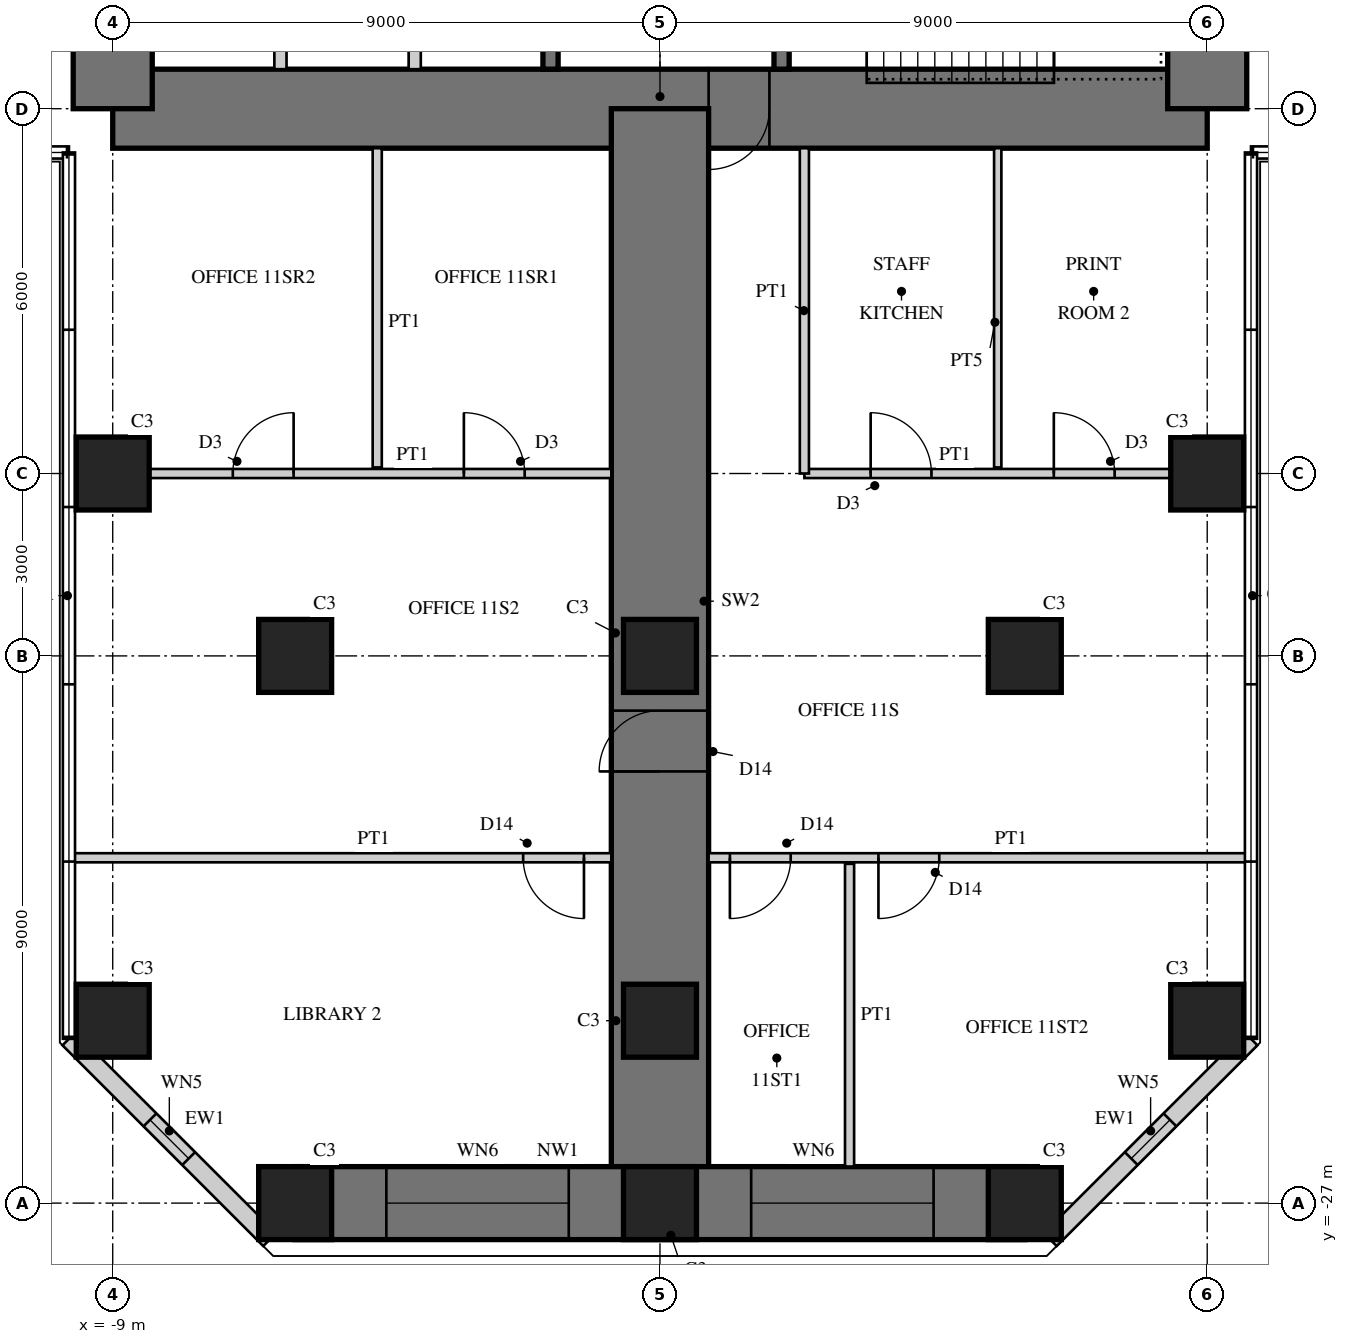
"""IFC4 building model, lengths in metres.
Left out: names, types, materials, properties, quantities, classifications, styles, units other than length and angle.
Written with IfcOpenShell. Run it as: python <this file> out.ifc"""

import sys

from ifc_helpers import new_model, si_unit, direction, frame, frame_2d, origin, origin_2d, place, context, subcontext, project, spatial, rectangle, hollow_rectangle, extrude, element, fill, save


model = new_model("IFC4")
c1 = context("Model", 3, precision=1e-05, world=origin(), true_north=direction((0.0, 1.0)))
c2 = subcontext(c1, "Body", "Model", "MODEL_VIEW")
j1 = project(units=[si_unit("LENGTHUNIT", "METRE"), si_unit("PLANEANGLEUNIT", "RADIAN")], contexts=[c1])
p1 = place(None, origin())
s1 = spatial("IfcSite", under=j1, at=p1, CompositionType="ELEMENT")
p2 = place(p1, origin())
s2 = spatial("IfcBuilding", under=s1, at=p2, CompositionType="ELEMENT")
p3 = place(p2, frame((0.0, 0.0, 47.5)))
s3 = spatial("IfcBuildingStorey", under=s2, at=p3, CompositionType="ELEMENT", Elevation=47.5)
p4 = place(p3, frame((-9.0, -9.0, 0.0), z_axis=(0.0, 0.0, 1.0), x_axis=(1.0, 0.0, 0.0)))
e1 = element("IfcWall", 1, at=p4, inside=s3, PredefinedType="SHEAR", context=c2, shape_type="SweptSolid", body=[
    extrude(rectangle(XDim=18.0, YDim=1.3, at=frame_2d((9.0, 0.0))), origin(), (0.0, 0.0, 1.0), 4.0),
])
p5 = place(p4, frame((9.8, 0.0, 0.0)))
e2 = element("IfcOpeningElement", 2, at=p5, cuts=e1, PredefinedType="OPENING", context=c2, shape_type="SweptSolid", body=[
    extrude(rectangle(XDim=1.0, YDim=2.4, at=frame_2d((0.5, 1.2))), frame((0.0, 0.66, 0.0), z_axis=(0.0, -1.0, 0.0), x_axis=(1.0, 0.0, 0.0)), (0.0, 0.0, 1.0), 1.32),
])
p6 = place(p3, frame((9.0, -9.0, 0.0), z_axis=(0.0, 0.0, 1.0), x_axis=(0.0, 1.0, 0.0)))
e3 = element("IfcWall", 3, at=p6, inside=s3, PredefinedType="SHEAR", context=c2, shape_type="SweptSolid", body=[
    extrude(rectangle(XDim=18.0, YDim=1.3, at=frame_2d((9.0, 0.0))), origin(), (0.0, 0.0, 1.0), 4.0),
])
p7 = place(p6, frame((9.8, 0.0, 0.0)))
e4 = element("IfcOpeningElement", 4, at=p7, cuts=e3, PredefinedType="OPENING", context=c2, shape_type="SweptSolid", body=[
    extrude(rectangle(XDim=1.0, YDim=2.4, at=frame_2d((0.5, 1.2))), frame((0.0, 0.66, 0.0), z_axis=(0.0, -1.0, 0.0), x_axis=(1.0, 0.0, 0.0)), (0.0, 0.0, 1.0), 1.32),
])
p8 = place(p3, frame((-9.0, 9.0, 0.0), z_axis=(0.0, 0.0, 1.0), x_axis=(0.0, -1.0, 0.0)))
e5 = element("IfcWall", 5, at=p8, inside=s3, PredefinedType="SHEAR", context=c2, shape_type="SweptSolid", body=[
    extrude(rectangle(XDim=18.0, YDim=1.3, at=frame_2d((9.0, 0.0))), origin(), (0.0, 0.0, 1.0), 4.0),
])
p9 = place(p8, frame((9.8, 0.0, 0.0)))
e6 = element("IfcOpeningElement", 6, at=p9, cuts=e5, PredefinedType="OPENING", context=c2, shape_type="SweptSolid", body=[
    extrude(rectangle(XDim=1.0, YDim=2.4, at=frame_2d((0.5, 1.2))), frame((0.0, 0.66, 0.0), z_axis=(0.0, -1.0, 0.0), x_axis=(1.0, 0.0, 0.0)), (0.0, 0.0, 1.0), 1.32),
])
p10 = place(p3, frame((-1.8, -1.875, 0.0), z_axis=(0.0, 0.0, 1.0), x_axis=(0.0, -1.0, 0.0)))
e7 = element("IfcWall", 7, at=p10, inside=s3, PredefinedType="SHEAR", context=c2, shape_type="SweptSolid", body=[
    extrude(rectangle(XDim=6.475, YDim=0.25, at=frame_2d((3.238, 0.0))), origin(), (0.0, 0.0, 1.0), 4.0),
])
p11 = place(p10, frame((1.875, 0.0, 0.0)))
e8 = element("IfcOpeningElement", 8, at=p11, cuts=e7, PredefinedType="OPENING", context=c2, shape_type="SweptSolid", body=[
    extrude(rectangle(XDim=1.6, YDim=2.4, at=frame_2d((0.8, 1.2))), frame((0.0, 0.135, 0.0), z_axis=(0.0, -1.0, 0.0), x_axis=(1.0, 0.0, 0.0)), (0.0, 0.0, 1.0), 0.27),
])
for number, where, z_axis, x_axis in (
    (9, (-4.033, -5.975, 0.0), (0.0, 0.0, 1.0), (0.0, -1.0, 0.0)),
    (10, (-6.242, -5.975, 0.0), (0.0, 0.0, 1.0), (0.0, -1.0, 0.0)),
):
    element("IfcWall", number, at=place(p3, frame(where, z_axis=z_axis, x_axis=x_axis)), inside=s3, PredefinedType="PARTITIONING", context=c2, shape_type="SweptSolid", body=[
        extrude(rectangle(XDim=2.375, YDim=0.2, at=frame_2d((1.188, 0.0))), origin(), (0.0, 0.0, 1.0), 4.0),
    ])
p12 = place(p3, frame((2.0, -1.675, 0.0), z_axis=(0.0, 0.0, 1.0), x_axis=(0.0, -1.0, 0.0)))
e11 = element("IfcWall", 11, at=p12, inside=s3, PredefinedType="SHEAR", context=c2, shape_type="SweptSolid", body=[
    extrude(rectangle(XDim=6.675, YDim=0.25, at=frame_2d((3.337, 0.0))), origin(), (0.0, 0.0, 1.0), 4.0),
])
p13 = place(p12, frame((0.725, 0.0, 0.0)))
e12 = element("IfcOpeningElement", 12, at=p13, cuts=e11, PredefinedType="OPENING", context=c2, shape_type="SweptSolid", body=[
    extrude(rectangle(XDim=1.0, YDim=2.1, at=frame_2d((0.5, 1.05))), frame((0.0, 0.135, 0.0), z_axis=(0.0, -1.0, 0.0), x_axis=(1.0, 0.0, 0.0)), (0.0, 0.0, 1.0), 0.27),
])
p14 = place(p3, frame((0.0, -9.0, 0.0), z_axis=(0.0, 0.0, 1.0), x_axis=(0.0, -1.0, 0.0)))
e13 = element("IfcWall", 13, at=p14, inside=s3, PredefinedType="SHEAR", context=c2, shape_type="SweptSolid", body=[
    extrude(rectangle(XDim=18.0, YDim=1.6, at=frame_2d((9.0, 0.0))), origin(), (0.0, 0.0, 1.0), 4.0),
])
p15 = place(p14, frame((9.9, 0.0, 0.0)))
e14 = element("IfcOpeningElement", 14, at=p15, cuts=e13, PredefinedType="OPENING", context=c2, shape_type="SweptSolid", body=[
    extrude(rectangle(XDim=1.0, YDim=2.2, at=frame_2d((0.5, 1.1))), frame((0.0, 0.81, 0.0), z_axis=(0.0, -1.0, 0.0), x_axis=(1.0, 0.0, 0.0)), (0.0, 0.0, 1.0), 1.62),
])
p16 = place(p3, frame((-6.0, -27.0, 0.0), z_axis=(0.0, 0.0, 1.0), x_axis=(1.0, 0.0, 0.0)))
e15 = element("IfcWall", 15, at=p16, inside=s3, PredefinedType="SHEAR", context=c2, shape_type="SweptSolid", body=[
    extrude(rectangle(XDim=12.0, YDim=1.2, at=frame_2d((6.0, 0.0))), origin(), (0.0, 0.0, 1.0), 4.0),
])
p17 = place(p16, frame((1.5, 0.0, 0.6)))
e16 = element("IfcOpeningElement", 16, at=p17, cuts=e15, PredefinedType="OPENING", context=c2, shape_type="SweptSolid", body=[
    extrude(rectangle(XDim=3.0, YDim=2.4, at=frame_2d((1.5, 1.2))), frame((0.0, 0.61, 0.0), z_axis=(0.0, -1.0, 0.0), x_axis=(1.0, 0.0, 0.0)), (0.0, 0.0, 1.0), 1.22),
])
p18 = place(p16, frame((7.5, 0.0, 0.6)))
e17 = element("IfcOpeningElement", 17, at=p18, cuts=e15, PredefinedType="OPENING", context=c2, shape_type="SweptSolid", body=[
    extrude(rectangle(XDim=3.0, YDim=2.4, at=frame_2d((1.5, 1.2))), frame((0.0, 0.61, 0.0), z_axis=(0.0, -1.0, 0.0), x_axis=(1.0, 0.0, 0.0)), (0.0, 0.0, 1.0), 1.22),
])
for number, where, z_axis, x_axis in (
    (18, (-9.0, -15.0, 0.0), (0.0, 0.0, 1.0), (1.0, 0.0, 0.0)),
    (19, (-9.0, -24.0, 0.0), (0.0, 0.0, 1.0), (1.0, 0.0, 0.0)),
    (20, (9.0, -15.0, 0.0), (0.0, 0.0, 1.0), (1.0, 0.0, 0.0)),
    (21, (9.0, -24.0, 0.0), (0.0, 0.0, 1.0), (1.0, 0.0, 0.0)),
    (22, (-6.0, -27.0, 0.0), (0.0, 0.0, 1.0), (1.0, 0.0, 0.0)),
    (23, (0.0, -27.0, 0.0), (0.0, 0.0, 1.0), (1.0, 0.0, 0.0)),
    (24, (6.0, -27.0, 0.0), (0.0, 0.0, 1.0), (1.0, 0.0, 0.0)),
    (25, (-6.0, -18.0, 0.0), (0.0, 0.0, 1.0), (1.0, 0.0, 0.0)),
    (26, (0.0, -18.0, 0.0), (0.0, 0.0, 1.0), (1.0, 0.0, 0.0)),
    (27, (6.0, -18.0, 0.0), (0.0, 0.0, 1.0), (1.0, 0.0, 0.0)),
    (28, (0.0, -24.0, 0.0), (0.0, 0.0, 1.0), (1.0, 0.0, 0.0)),
):
    element("IfcColumn", number, at=place(p3, frame(where, z_axis=z_axis, x_axis=x_axis)), inside=s3, PredefinedType="COLUMN", context=c2, shape_type="SweptSolid", body=[
        extrude(rectangle(XDim=1.2, YDim=1.2, at=origin_2d()), origin(), (0.0, 0.0, 1.0), 4.0),
    ])
p19 = place(p3, frame((-9.72, -24.298, 0.0), z_axis=(0.0, 0.0, 1.0), x_axis=(0.707106781187, -0.707106781187, 0.0)))
e29 = element("IfcWall", 29, at=p19, inside=s3, PredefinedType="SOLIDWALL", context=c2, shape_type="SweptSolid", body=[
    extrude(rectangle(XDim=4.669, YDim=0.3, at=frame_2d((2.335, 0.0))), origin(), (0.0, 0.0, 1.0), 3.8),
])
p20 = place(p19, frame((1.885, 0.0, 0.3)))
e30 = element("IfcOpeningElement", 30, at=p20, cuts=e29, PredefinedType="OPENING", context=c2, shape_type="SweptSolid", body=[
    extrude(rectangle(XDim=0.9, YDim=2.4, at=frame_2d((0.45, 1.2))), frame((0.0, 0.16, 0.0), z_axis=(0.0, -1.0, 0.0), x_axis=(1.0, 0.0, 0.0)), (0.0, 0.0, 1.0), 0.32),
])
p21 = place(p3, frame((6.418, -27.6, 0.0), z_axis=(0.0, 0.0, 1.0), x_axis=(0.707106781187, 0.707106781187, 0.0)))
e31 = element("IfcWall", 31, at=p21, inside=s3, PredefinedType="SOLIDWALL", context=c2, shape_type="SweptSolid", body=[
    extrude(rectangle(XDim=4.669, YDim=0.3, at=frame_2d((2.335, 0.0))), origin(), (0.0, 0.0, 1.0), 3.8),
])
p22 = place(p21, frame((1.885, 0.0, 0.3)))
e32 = element("IfcOpeningElement", 32, at=p22, cuts=e31, PredefinedType="OPENING", context=c2, shape_type="SweptSolid", body=[
    extrude(rectangle(XDim=0.9, YDim=2.4, at=frame_2d((0.45, 1.2))), frame((0.0, 0.16, 0.0), z_axis=(0.0, -1.0, 0.0), x_axis=(1.0, 0.0, 0.0)), (0.0, 0.0, 1.0), 0.32),
])
p23 = place(p3, frame((2.375, -15.0, 0.0), z_axis=(0.0, 0.0, 1.0), x_axis=(1.0, 0.0, 0.0)))
e33 = element("IfcWall", 33, at=p23, inside=s3, PredefinedType="PARTITIONING", context=c2, shape_type="SweptSolid", body=[
    extrude(rectangle(XDim=6.025, YDim=0.15, at=frame_2d((3.012, 0.0))), origin(), (0.0, 0.0, 1.0), 2.95),
])
p24 = place(p23, frame((1.09, 0.0, 0.0)))
e34 = element("IfcOpeningElement", 34, at=p24, cuts=e33, PredefinedType="OPENING", context=c2, shape_type="SweptSolid", body=[
    extrude(rectangle(XDim=1.0, YDim=2.1, at=frame_2d((0.5, 1.05))), frame((0.0, 0.085, 0.0), z_axis=(0.0, -1.0, 0.0), x_axis=(1.0, 0.0, 0.0)), (0.0, 0.0, 1.0), 0.17),
])
p25 = place(p23, frame((4.102, 0.0, 0.0)))
e35 = element("IfcOpeningElement", 35, at=p25, cuts=e33, PredefinedType="OPENING", context=c2, shape_type="SweptSolid", body=[
    extrude(rectangle(XDim=1.0, YDim=2.1, at=frame_2d((0.5, 1.05))), frame((0.0, 0.085, 0.0), z_axis=(0.0, -1.0, 0.0), x_axis=(1.0, 0.0, 0.0)), (0.0, 0.0, 1.0), 0.17),
])
p26 = place(p3, frame((2.375, -9.65, 0.0), z_axis=(0.0, 0.0, 1.0), x_axis=(0.0, -1.0, 0.0)))
e36 = element("IfcWall", 36, at=p26, inside=s3, PredefinedType="PARTITIONING", context=c2, shape_type="SweptSolid", body=[
    extrude(rectangle(XDim=5.35, YDim=0.15, at=frame_2d((2.675, 0.0))), origin(), (0.0, 0.0, 1.0), 3.8),
])
p27 = place(p3, frame((5.555, -9.65, 0.0), z_axis=(0.0, 0.0, 1.0), x_axis=(0.0, -1.0, 0.0)))
e37 = element("IfcWall", 37, at=p27, inside=s3, PredefinedType="PLUMBINGWALL", context=c2, shape_type="SweptSolid", body=[
    extrude(rectangle(XDim=5.25, YDim=0.12, at=frame_2d((2.625, 0.0))), origin(), (0.0, 0.0, 1.0), 3.8),
])
p28 = place(p3, frame((-8.4, -15.0, 0.0), z_axis=(0.0, 0.0, 1.0), x_axis=(1.0, 0.0, 0.0)))
e38 = element("IfcWall", 38, at=p28, inside=s3, PredefinedType="PARTITIONING", context=c2, shape_type="SweptSolid", body=[
    extrude(rectangle(XDim=7.6, YDim=0.15, at=frame_2d((3.8, 0.0))), origin(), (0.0, 0.0, 1.0), 2.95),
])
p29 = place(p28, frame((1.375, 0.0, 0.0)))
e39 = element("IfcOpeningElement", 39, at=p29, cuts=e38, PredefinedType="OPENING", context=c2, shape_type="SweptSolid", body=[
    extrude(rectangle(XDim=1.0, YDim=2.1, at=frame_2d((0.5, 1.05))), frame((0.0, 0.085, 0.0), z_axis=(0.0, -1.0, 0.0), x_axis=(1.0, 0.0, 0.0)), (0.0, 0.0, 1.0), 0.17),
])
p30 = place(p28, frame((5.175, 0.0, 0.0)))
e40 = element("IfcOpeningElement", 40, at=p30, cuts=e38, PredefinedType="OPENING", context=c2, shape_type="SweptSolid", body=[
    extrude(rectangle(XDim=1.0, YDim=2.1, at=frame_2d((0.5, 1.05))), frame((0.0, 0.085, 0.0), z_axis=(0.0, -1.0, 0.0), x_axis=(1.0, 0.0, 0.0)), (0.0, 0.0, 1.0), 0.17),
])
p31 = place(p3, frame((-4.65, -9.65, 0.0), z_axis=(0.0, 0.0, 1.0), x_axis=(0.0, -1.0, 0.0)))
e41 = element("IfcWall", 41, at=p31, inside=s3, PredefinedType="PARTITIONING", context=c2, shape_type="SweptSolid", body=[
    extrude(rectangle(XDim=5.25, YDim=0.15, at=frame_2d((2.625, 0.0))), origin(), (0.0, 0.0, 1.0), 3.8),
])
p32 = place(p3, frame((3.118, -21.42, 0.0), z_axis=(0.0, 0.0, 1.0), x_axis=(0.0, -1.0, 0.0)))
e42 = element("IfcWall", 42, at=p32, inside=s3, PredefinedType="PARTITIONING", context=c2, shape_type="SweptSolid", body=[
    extrude(rectangle(XDim=4.98, YDim=0.15, at=frame_2d((2.49, 0.0))), origin(), (0.0, 0.0, 1.0), 3.8),
])
p33 = place(p3, frame((0.8, -21.32, 0.0), z_axis=(0.0, 0.0, 1.0), x_axis=(1.0, 0.0, 0.0)))
e43 = element("IfcWall", 43, at=p33, inside=s3, PredefinedType="PARTITIONING", context=c2, shape_type="SweptSolid", body=[
    extrude(rectangle(XDim=8.88, YDim=0.15, at=frame_2d((4.44, 0.0))), origin(), (0.0, 0.0, 1.0), 3.8),
])
p34 = place(p33, frame((0.35, 0.0, 0.0)))
e44 = element("IfcOpeningElement", 44, at=p34, cuts=e43, PredefinedType="OPENING", context=c2, shape_type="SweptSolid", body=[
    extrude(rectangle(XDim=1.0, YDim=2.2, at=frame_2d((0.5, 1.1))), frame((0.0, 0.085, 0.0), z_axis=(0.0, -1.0, 0.0), x_axis=(1.0, 0.0, 0.0)), (0.0, 0.0, 1.0), 0.17),
])
p35 = place(p33, frame((2.793, 0.0, 0.0)))
e45 = element("IfcOpeningElement", 45, at=p35, cuts=e43, PredefinedType="OPENING", context=c2, shape_type="SweptSolid", body=[
    extrude(rectangle(XDim=1.0, YDim=2.2, at=frame_2d((0.5, 1.1))), frame((0.0, 0.085, 0.0), z_axis=(0.0, -1.0, 0.0), x_axis=(1.0, 0.0, 0.0)), (0.0, 0.0, 1.0), 0.17),
])
p36 = place(p3, frame((-9.68, -21.32, 0.0), z_axis=(0.0, 0.0, 1.0), x_axis=(1.0, 0.0, 0.0)))
e46 = element("IfcWall", 46, at=p36, inside=s3, PredefinedType="PARTITIONING", context=c2, shape_type="SweptSolid", body=[
    extrude(rectangle(XDim=8.88, YDim=0.15, at=frame_2d((4.44, 0.0))), origin(), (0.0, 0.0, 1.0), 3.8),
])
p37 = place(p36, frame((7.43, 0.0, 0.0)))
e47 = element("IfcOpeningElement", 47, at=p37, cuts=e46, PredefinedType="OPENING", context=c2, shape_type="SweptSolid", body=[
    extrude(rectangle(XDim=1.0, YDim=2.2, at=frame_2d((0.5, 1.1))), frame((0.0, 0.085, 0.0), z_axis=(0.0, -1.0, 0.0), x_axis=(1.0, 0.0, 0.0)), (0.0, 0.0, 1.0), 0.17),
])
p38 = place(p20, origin())
e48 = element("IfcWindow", 48, at=p38, inside=s3, PartitioningType="SINGLE_PANEL", PredefinedType="WINDOW", context=c2, shape_type="SweptSolid", body=[
    extrude(hollow_rectangle(XDim=0.9, YDim=2.4, WallThickness=0.06, at=frame_2d((0.45, 1.2))), frame((0.0, 0.03, 0.0), z_axis=(0.0, -1.0, 0.0), x_axis=(1.0, 0.0, 0.0)), (0.0, 0.0, 1.0), 0.06),
    extrude(rectangle(XDim=0.779, YDim=2.279, at=frame_2d((0.45, 1.2))), frame((0.0, 0.03, 0.0), z_axis=(0.0, -1.0, 0.0), x_axis=(1.0, 0.0, 0.0)), (0.0, 0.0, 1.0), 0.06),
])
fill(e30, e48)
p39 = place(p17, origin())
e49 = element("IfcWindow", 49, at=p39, inside=s3, PartitioningType="SINGLE_PANEL", PredefinedType="WINDOW", context=c2, shape_type="SweptSolid", body=[
    extrude(hollow_rectangle(XDim=3.0, YDim=2.4, WallThickness=0.06, at=frame_2d((1.5, 1.2))), frame((0.0, 0.03, 0.0), z_axis=(0.0, -1.0, 0.0), x_axis=(1.0, 0.0, 0.0)), (0.0, 0.0, 1.0), 0.06),
    extrude(rectangle(XDim=2.879, YDim=2.279, at=frame_2d((1.5, 1.2))), frame((0.0, 0.03, 0.0), z_axis=(0.0, -1.0, 0.0), x_axis=(1.0, 0.0, 0.0)), (0.0, 0.0, 1.0), 0.06),
])
fill(e16, e49)
p40 = place(p18, origin())
e50 = element("IfcWindow", 50, at=p40, inside=s3, PartitioningType="SINGLE_PANEL", PredefinedType="WINDOW", context=c2, shape_type="SweptSolid", body=[
    extrude(hollow_rectangle(XDim=3.0, YDim=2.4, WallThickness=0.06, at=frame_2d((1.5, 1.2))), frame((0.0, 0.03, 0.0), z_axis=(0.0, -1.0, 0.0), x_axis=(1.0, 0.0, 0.0)), (0.0, 0.0, 1.0), 0.06),
    extrude(rectangle(XDim=2.879, YDim=2.279, at=frame_2d((1.5, 1.2))), frame((0.0, 0.03, 0.0), z_axis=(0.0, -1.0, 0.0), x_axis=(1.0, 0.0, 0.0)), (0.0, 0.0, 1.0), 0.06),
])
fill(e17, e50)
p41 = place(p22, origin())
e51 = element("IfcWindow", 51, at=p41, inside=s3, PartitioningType="SINGLE_PANEL", PredefinedType="WINDOW", context=c2, shape_type="SweptSolid", body=[
    extrude(hollow_rectangle(XDim=0.9, YDim=2.4, WallThickness=0.06, at=frame_2d((0.45, 1.2))), frame((0.0, 0.03, 0.0), z_axis=(0.0, -1.0, 0.0), x_axis=(1.0, 0.0, 0.0)), (0.0, 0.0, 1.0), 0.06),
    extrude(rectangle(XDim=0.779, YDim=2.279, at=frame_2d((0.45, 1.2))), frame((0.0, 0.03, 0.0), z_axis=(0.0, -1.0, 0.0), x_axis=(1.0, 0.0, 0.0)), (0.0, 0.0, 1.0), 0.06),
])
fill(e32, e51)
p42 = place(p24, origin())
e52 = element("IfcDoor", 52, at=p42, inside=s3, OperationType="SINGLE_SWING_LEFT", PredefinedType="DOOR", context=c2, shape_type="SweptSolid", body=[
    extrude(rectangle(XDim=1.0, YDim=2.1, at=frame_2d((0.5, 1.05))), frame((0.0, 0.025, 0.0), z_axis=(0.0, -1.0, 0.0), x_axis=(1.0, 0.0, 0.0)), (0.0, 0.0, 1.0), 0.05),
])
fill(e34, e52)
p43 = place(p25, origin())
e53 = element("IfcDoor", 53, at=p43, inside=s3, OperationType="SINGLE_SWING_LEFT", PredefinedType="DOOR", context=c2, shape_type="SweptSolid", body=[
    extrude(rectangle(XDim=1.0, YDim=2.1, at=frame_2d((0.5, 1.05))), frame((0.0, 0.025, 0.0), z_axis=(0.0, -1.0, 0.0), x_axis=(1.0, 0.0, 0.0)), (0.0, 0.0, 1.0), 0.05),
])
fill(e35, e53)
p44 = place(p29, origin())
e54 = element("IfcDoor", 54, at=p44, inside=s3, OperationType="SINGLE_SWING_RIGHT", PredefinedType="DOOR", context=c2, shape_type="SweptSolid", body=[
    extrude(rectangle(XDim=1.0, YDim=2.1, at=frame_2d((0.5, 1.05))), frame((0.0, 0.025, 0.0), z_axis=(0.0, -1.0, 0.0), x_axis=(1.0, 0.0, 0.0)), (0.0, 0.0, 1.0), 0.05),
])
fill(e39, e54)
p45 = place(p30, origin())
e55 = element("IfcDoor", 55, at=p45, inside=s3, OperationType="SINGLE_SWING_LEFT", PredefinedType="DOOR", context=c2, shape_type="SweptSolid", body=[
    extrude(rectangle(XDim=1.0, YDim=2.1, at=frame_2d((0.5, 1.05))), frame((0.0, 0.025, 0.0), z_axis=(0.0, -1.0, 0.0), x_axis=(1.0, 0.0, 0.0)), (0.0, 0.0, 1.0), 0.05),
])
fill(e40, e55)
p46 = place(p34, frame((1.0, 0.0, 0.0), z_axis=(0.0, 0.0, 1.0), x_axis=(-1.0, 0.0, 0.0)))
e56 = element("IfcDoor", 56, at=p46, inside=s3, OperationType="SINGLE_SWING_RIGHT", PredefinedType="DOOR", context=c2, shape_type="SweptSolid", body=[
    extrude(rectangle(XDim=1.0, YDim=2.2, at=frame_2d((0.5, 1.1))), frame((0.0, 0.025, 0.0), z_axis=(0.0, -1.0, 0.0), x_axis=(1.0, 0.0, 0.0)), (0.0, 0.0, 1.0), 0.05),
])
fill(e44, e56)
p47 = place(p35, frame((1.0, 0.0, 0.0), z_axis=(0.0, 0.0, 1.0), x_axis=(-1.0, 0.0, 0.0)))
e57 = element("IfcDoor", 57, at=p47, inside=s3, OperationType="SINGLE_SWING_RIGHT", PredefinedType="DOOR", context=c2, shape_type="SweptSolid", body=[
    extrude(rectangle(XDim=1.0, YDim=2.2, at=frame_2d((0.5, 1.1))), frame((0.0, 0.025, 0.0), z_axis=(0.0, -1.0, 0.0), x_axis=(1.0, 0.0, 0.0)), (0.0, 0.0, 1.0), 0.05),
])
fill(e45, e57)
p48 = place(p37, frame((1.0, 0.0, 0.0), z_axis=(0.0, 0.0, 1.0), x_axis=(-1.0, 0.0, 0.0)))
e58 = element("IfcDoor", 58, at=p48, inside=s3, OperationType="SINGLE_SWING_LEFT", PredefinedType="DOOR", context=c2, shape_type="SweptSolid", body=[
    extrude(rectangle(XDim=1.0, YDim=2.2, at=frame_2d((0.5, 1.1))), frame((0.0, 0.025, 0.0), z_axis=(0.0, -1.0, 0.0), x_axis=(1.0, 0.0, 0.0)), (0.0, 0.0, 1.0), 0.05),
])
fill(e47, e58)
p49 = place(p15, frame((1.0, 0.0, 0.0), z_axis=(0.0, 0.0, 1.0), x_axis=(-1.0, 0.0, 0.0)))
e59 = element("IfcDoor", 59, at=p49, inside=s3, OperationType="SINGLE_SWING_LEFT", PredefinedType="DOOR", context=c2, shape_type="SweptSolid", body=[
    extrude(rectangle(XDim=1.0, YDim=2.2, at=frame_2d((0.5, 1.1))), frame((0.0, 0.025, 0.0), z_axis=(0.0, -1.0, 0.0), x_axis=(1.0, 0.0, 0.0)), (0.0, 0.0, 1.0), 0.05),
])
fill(e14, e59)
p50 = place(p5, frame((1.0, 0.0, 0.0), z_axis=(0.0, 0.0, 1.0), x_axis=(-1.0, 0.0, 0.0)))
e60 = element("IfcDoor", 60, at=p50, inside=s3, OperationType="SINGLE_SWING_RIGHT", PredefinedType="DOOR", context=c2, shape_type="SweptSolid", body=[
    extrude(rectangle(XDim=1.0, YDim=2.4, at=frame_2d((0.5, 1.2))), frame((0.0, -0.005, 0.0), z_axis=(0.0, -1.0, 0.0), x_axis=(1.0, 0.0, 0.0)), (0.0, 0.0, 1.0), 0.05),
])
fill(e2, e60)
save(model, sys.argv[1])
